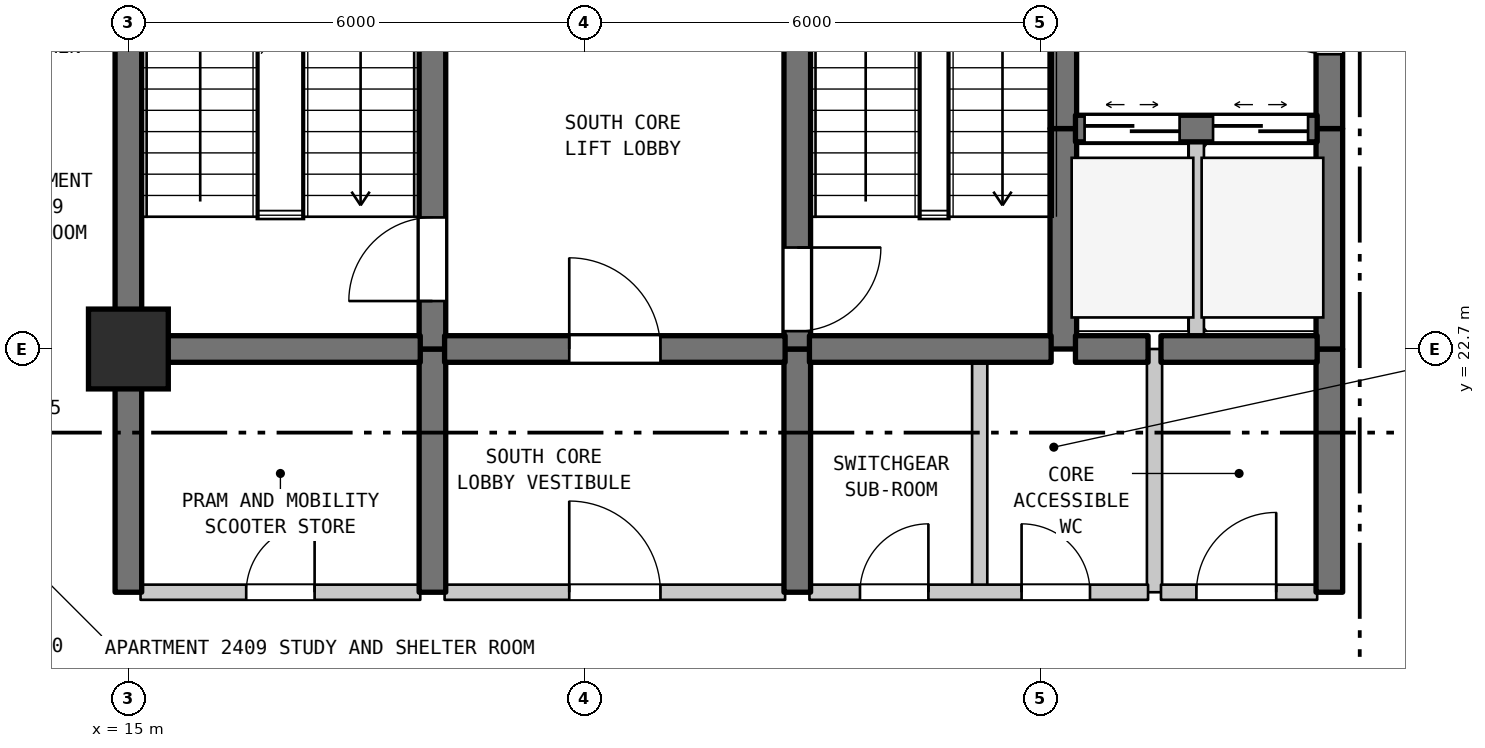
"""IFC4 building model, lengths in metres.
Left out: names, types, materials, properties, quantities, classifications, styles, units other than length and angle.
Written with IfcOpenShell. Run it as: python <this file> out.ifc"""

import sys

from ifc_helpers import new_model, si_unit, direction, frame, frame_2d, origin, origin_2d, place, context, subcontext, project, spatial, rectangle, extrude, element, fill, save


model = new_model("IFC4")
c1 = context("Model", 3, precision=1e-05, world=origin(), true_north=direction((0.0, 1.0)))
c2 = subcontext(c1, "Body", "Model", "MODEL_VIEW")
j1 = project(units=[si_unit("LENGTHUNIT", "METRE"), si_unit("PLANEANGLEUNIT", "RADIAN")], contexts=[c1])
p1 = place(None, origin())
s1 = spatial("IfcSite", under=j1, at=p1, CompositionType="ELEMENT")
p2 = place(p1, origin())
s2 = spatial("IfcBuilding", under=s1, at=p2, CompositionType="ELEMENT")
p3 = place(p2, frame((0.0, 0.0, 102.0)))
s3 = spatial("IfcBuildingStorey", under=s2, at=p3, CompositionType="ELEMENT", Elevation=102.0)
p4 = place(p3, frame((15.0, 22.7, 0.0), z_axis=(0.0, 0.0, 1.0), x_axis=(1.0, 0.0, 0.0)))
e1 = element("IfcColumn", 1, at=p4, inside=s3, PredefinedType="COLUMN", context=c2, shape_type="SweptSolid", body=[
    extrude(rectangle(XDim=1.05, YDim=1.05, at=origin_2d()), origin(), (0.0, 0.0, 1.0), 3.7),
])
p5 = place(p3, frame((15.0, 19.5, 0.0), z_axis=(0.0, 0.0, 1.0), x_axis=(0.0, 1.0, 0.0)))
e2 = element("IfcWall", 2, at=p5, inside=s3, PredefinedType="SHEAR", context=c2, shape_type="SweptSolid", body=[
    extrude(rectangle(XDim=3.2, YDim=0.35, at=frame_2d((1.6, 0.0))), origin(), (0.0, 0.0, 1.0), 3.385),
])
p6 = place(p3, frame((15.0, 22.7, 0.0), z_axis=(0.0, 0.0, 1.0), x_axis=(0.0, 1.0, 0.0)))
e3 = element("IfcWall", 3, at=p6, inside=s3, PredefinedType="SHEAR", context=c2, shape_type="SweptSolid", body=[
    extrude(rectangle(XDim=6.8, YDim=0.35, at=frame_2d((3.4, 0.0))), origin(), (0.0, 0.0, 1.0), 3.385),
])
p7 = place(p3, frame((19.0, 19.5, 0.0), z_axis=(0.0, 0.0, 1.0), x_axis=(0.0, 1.0, 0.0)))
e4 = element("IfcWall", 4, at=p7, inside=s3, PredefinedType="SHEAR", context=c2, shape_type="SweptSolid", body=[
    extrude(rectangle(XDim=3.2, YDim=0.35, at=frame_2d((1.6, 0.0))), origin(), (0.0, 0.0, 1.0), 3.385),
])
p8 = place(p3, frame((19.0, 22.7, 0.0), z_axis=(0.0, 0.0, 1.0), x_axis=(0.0, 1.0, 0.0)))
e5 = element("IfcWall", 5, at=p8, inside=s3, PredefinedType="SHEAR", context=c2, shape_type="SweptSolid", body=[
    extrude(rectangle(XDim=5.5, YDim=0.35, at=frame_2d((2.75, 0.0))), origin(), (0.0, 0.0, 1.0), 3.385),
])
p9 = place(p8, frame((0.631, 0.0, 0.0)))
e6 = element("IfcOpeningElement", 6, at=p9, cuts=e5, PredefinedType="OPENING", context=c2, shape_type="SweptSolid", body=[
    extrude(rectangle(XDim=1.1, YDim=2.15, at=frame_2d((0.55, 1.075))), frame((0.0, 0.185, 0.0), z_axis=(0.0, -1.0, 0.0), x_axis=(1.0, 0.0, 0.0)), (0.0, 0.0, 1.0), 0.37),
])
p10 = place(p3, frame((23.8, 19.5, 0.0), z_axis=(0.0, 0.0, 1.0), x_axis=(0.0, 1.0, 0.0)))
e7 = element("IfcWall", 7, at=p10, inside=s3, PredefinedType="SHEAR", context=c2, shape_type="SweptSolid", body=[
    extrude(rectangle(XDim=3.2, YDim=0.35, at=frame_2d((1.6, 0.0))), origin(), (0.0, 0.0, 1.0), 3.385),
])
p11 = place(p3, frame((23.8, 22.7, 0.0), z_axis=(0.0, 0.0, 1.0), x_axis=(0.0, 1.0, 0.0)))
e8 = element("IfcWall", 8, at=p11, inside=s3, PredefinedType="SHEAR", context=c2, shape_type="SweptSolid", body=[
    extrude(rectangle(XDim=5.5, YDim=0.35, at=frame_2d((2.75, 0.0))), origin(), (0.0, 0.0, 1.0), 3.385),
])
p12 = place(p11, frame((0.235, 0.0, 0.0)))
e9 = element("IfcOpeningElement", 9, at=p12, cuts=e8, PredefinedType="OPENING", context=c2, shape_type="SweptSolid", body=[
    extrude(rectangle(XDim=1.1, YDim=2.15, at=frame_2d((0.55, 1.075))), frame((0.0, 0.185, 0.0), z_axis=(0.0, -1.0, 0.0), x_axis=(1.0, 0.0, 0.0)), (0.0, 0.0, 1.0), 0.37),
])
p13 = place(p3, frame((26.2, 19.5, 0.0), z_axis=(0.0, 0.0, 1.0), x_axis=(0.0, 1.0, 0.0)))
e10 = element("IfcWall", 10, at=p13, inside=s3, PredefinedType="STANDARD", context=c2, shape_type="SweptSolid", body=[
    extrude(rectangle(XDim=3.2, YDim=0.2, at=frame_2d((1.6, 0.0))), origin(), (0.0, 0.0, 1.0), 3.385),
])
p14 = place(p3, frame((27.3, 22.7, 0.0), z_axis=(0.0, 0.0, 1.0), x_axis=(0.0, 1.0, 0.0)))
e11 = element("IfcWall", 11, at=p14, inside=s3, PredefinedType="SHEAR", context=c2, shape_type="SweptSolid", body=[
    extrude(rectangle(XDim=2.9, YDim=0.35, at=frame_2d((1.45, 0.0))), origin(), (0.0, 0.0, 1.0), 3.385),
])
p15 = place(p3, frame((27.3, 25.6, 0.0), z_axis=(0.0, 0.0, 1.0), x_axis=(0.0, 1.0, 0.0)))
e12 = element("IfcWall", 12, at=p15, inside=s3, PredefinedType="SHEAR", context=c2, shape_type="SweptSolid", body=[
    extrude(rectangle(XDim=3.3, YDim=0.35, at=frame_2d((1.65, 0.0))), origin(), (0.0, 0.0, 1.0), 3.385),
])
p16 = place(p3, frame((28.5, 19.5, 0.0), z_axis=(0.0, 0.0, 1.0), x_axis=(0.0, 1.0, 0.0)))
e13 = element("IfcWall", 13, at=p16, inside=s3, PredefinedType="STANDARD", context=c2, shape_type="SweptSolid", body=[
    extrude(rectangle(XDim=3.2, YDim=0.2, at=frame_2d((1.6, 0.0))), origin(), (0.0, 0.0, 1.0), 3.385),
])
p17 = place(p3, frame((29.05, 22.7, 0.0), z_axis=(0.0, 0.0, 1.0), x_axis=(0.0, 1.0, 0.0)))
e14 = element("IfcWall", 14, at=p17, inside=s3, PredefinedType="STANDARD", context=c2, shape_type="SweptSolid", body=[
    extrude(rectangle(XDim=2.9, YDim=0.2, at=frame_2d((1.45, 0.0))), origin(), (0.0, 0.0, 1.0), 3.385),
])
p18 = place(p3, frame((30.8, 19.5, 0.0), z_axis=(0.0, 0.0, 1.0), x_axis=(0.0, 1.0, 0.0)))
e15 = element("IfcWall", 15, at=p18, inside=s3, PredefinedType="SHEAR", context=c2, shape_type="SweptSolid", body=[
    extrude(rectangle(XDim=3.2, YDim=0.35, at=frame_2d((1.6, 0.0))), origin(), (0.0, 0.0, 1.0), 3.385),
])
p19 = place(p3, frame((30.8, 22.7, 0.0), z_axis=(0.0, 0.0, 1.0), x_axis=(0.0, 1.0, 0.0)))
e16 = element("IfcWall", 16, at=p19, inside=s3, PredefinedType="SHEAR", context=c2, shape_type="SweptSolid", body=[
    extrude(rectangle(XDim=2.9, YDim=0.35, at=frame_2d((1.45, 0.0))), origin(), (0.0, 0.0, 1.0), 3.385),
])
p20 = place(p3, frame((30.8, 25.6, 0.0), z_axis=(0.0, 0.0, 1.0), x_axis=(0.0, 1.0, 0.0)))
e17 = element("IfcWall", 17, at=p20, inside=s3, PredefinedType="SHEAR", context=c2, shape_type="SweptSolid", body=[
    extrude(rectangle(XDim=3.3, YDim=0.35, at=frame_2d((1.65, 0.0))), origin(), (0.0, 0.0, 1.0), 3.385),
])
p21 = place(p20, frame((0.978, 0.0, 0.0)))
e18 = element("IfcOpeningElement", 18, at=p21, cuts=e17, PredefinedType="OPENING", context=c2, shape_type="SweptSolid", body=[
    extrude(rectangle(XDim=1.2, YDim=2.2, at=frame_2d((0.6, 1.1))), frame((0.0, 0.185, 0.0), z_axis=(0.0, -1.0, 0.0), x_axis=(1.0, 0.0, 0.0)), (0.0, 0.0, 1.0), 0.37),
])
p22 = place(p3, frame((15.16, 19.5, 0.0), z_axis=(0.0, 0.0, 1.0), x_axis=(1.0, 0.0, 0.0)))
e19 = element("IfcWall", 19, at=p22, inside=s3, PredefinedType="STANDARD", context=c2, shape_type="SweptSolid", body=[
    extrude(rectangle(XDim=3.68, YDim=0.2, at=frame_2d((1.84, 0.0))), origin(), (0.0, 0.0, 1.0), 3.385),
])
p23 = place(p22, frame((1.39, 0.0, 0.0)))
e20 = element("IfcOpeningElement", 20, at=p23, cuts=e19, PredefinedType="OPENING", context=c2, shape_type="SweptSolid", body=[
    extrude(rectangle(XDim=0.9, YDim=2.15, at=frame_2d((0.45, 1.075))), frame((0.0, 0.11, 0.0), z_axis=(0.0, -1.0, 0.0), x_axis=(1.0, 0.0, 0.0)), (0.0, 0.0, 1.0), 0.22),
])
p24 = place(p3, frame((19.16, 19.5, 0.0), z_axis=(0.0, 0.0, 1.0), x_axis=(1.0, 0.0, 0.0)))
e21 = element("IfcWall", 21, at=p24, inside=s3, PredefinedType="STANDARD", context=c2, shape_type="SweptSolid", body=[
    extrude(rectangle(XDim=4.48, YDim=0.2, at=frame_2d((2.24, 0.0))), origin(), (0.0, 0.0, 1.0), 3.385),
])
p25 = place(p24, frame((1.64, 0.0, 0.0)))
e22 = element("IfcOpeningElement", 22, at=p25, cuts=e21, PredefinedType="OPENING", context=c2, shape_type="SweptSolid", body=[
    extrude(rectangle(XDim=1.2, YDim=2.2, at=frame_2d((0.6, 1.1))), frame((0.0, 0.11, 0.0), z_axis=(0.0, -1.0, 0.0), x_axis=(1.0, 0.0, 0.0)), (0.0, 0.0, 1.0), 0.22),
])
p26 = place(p3, frame((23.96, 19.5, 0.0), z_axis=(0.0, 0.0, 1.0), x_axis=(1.0, 0.0, 0.0)))
e23 = element("IfcWall", 23, at=p26, inside=s3, PredefinedType="STANDARD", context=c2, shape_type="SweptSolid", body=[
    extrude(rectangle(XDim=4.455, YDim=0.2, at=frame_2d((2.228, 0.0))), origin(), (0.0, 0.0, 1.0), 3.385),
])
p27 = place(p26, frame((0.665, 0.0, 0.0)))
e24 = element("IfcOpeningElement", 24, at=p27, cuts=e23, PredefinedType="OPENING", context=c2, shape_type="SweptSolid", body=[
    extrude(rectangle(XDim=0.9, YDim=2.15, at=frame_2d((0.45, 1.075))), frame((0.0, 0.11, 0.0), z_axis=(0.0, -1.0, 0.0), x_axis=(1.0, 0.0, 0.0)), (0.0, 0.0, 1.0), 0.22),
])
p28 = place(p26, frame((2.791, 0.0, 0.0)))
e25 = element("IfcOpeningElement", 25, at=p28, cuts=e23, PredefinedType="OPENING", context=c2, shape_type="SweptSolid", body=[
    extrude(rectangle(XDim=0.9, YDim=2.15, at=frame_2d((0.45, 1.075))), frame((0.0, 0.11, 0.0), z_axis=(0.0, -1.0, 0.0), x_axis=(1.0, 0.0, 0.0)), (0.0, 0.0, 1.0), 0.22),
])
p29 = place(p3, frame((28.585, 19.5, 0.0), z_axis=(0.0, 0.0, 1.0), x_axis=(1.0, 0.0, 0.0)))
e26 = element("IfcWall", 26, at=p29, inside=s3, PredefinedType="STANDARD", context=c2, shape_type="SweptSolid", body=[
    extrude(rectangle(XDim=2.055, YDim=0.2, at=frame_2d((1.027, 0.0))), origin(), (0.0, 0.0, 1.0), 3.385),
])
p30 = place(p29, frame((0.466, 0.0, 0.0)))
e27 = element("IfcOpeningElement", 27, at=p30, cuts=e26, PredefinedType="OPENING", context=c2, shape_type="SweptSolid", body=[
    extrude(rectangle(XDim=1.05, YDim=2.15, at=frame_2d((0.525, 1.075))), frame((0.0, 0.11, 0.0), z_axis=(0.0, -1.0, 0.0), x_axis=(1.0, 0.0, 0.0)), (0.0, 0.0, 1.0), 0.22),
])
p31 = place(p3, frame((15.16, 22.7, 0.0), z_axis=(0.0, 0.0, 1.0), x_axis=(1.0, 0.0, 0.0)))
e28 = element("IfcWall", 28, at=p31, inside=s3, PredefinedType="SHEAR", context=c2, shape_type="SweptSolid", body=[
    extrude(rectangle(XDim=3.68, YDim=0.35, at=frame_2d((1.84, 0.0))), origin(), (0.0, 0.0, 1.0), 3.385),
])
p32 = place(p3, frame((19.16, 22.7, 0.0), z_axis=(0.0, 0.0, 1.0), x_axis=(1.0, 0.0, 0.0)))
e29 = element("IfcWall", 29, at=p32, inside=s3, PredefinedType="SHEAR", context=c2, shape_type="SweptSolid", body=[
    extrude(rectangle(XDim=4.48, YDim=0.35, at=frame_2d((2.24, 0.0))), origin(), (0.0, 0.0, 1.0), 3.385),
])
p33 = place(p32, frame((1.64, 0.0, 0.0)))
e30 = element("IfcOpeningElement", 30, at=p33, cuts=e29, PredefinedType="OPENING", context=c2, shape_type="SweptSolid", body=[
    extrude(rectangle(XDim=1.2, YDim=2.2, at=frame_2d((0.6, 1.1))), frame((0.0, 0.185, 0.0), z_axis=(0.0, -1.0, 0.0), x_axis=(1.0, 0.0, 0.0)), (0.0, 0.0, 1.0), 0.37),
])
p34 = place(p3, frame((23.96, 22.7, 0.0), z_axis=(0.0, 0.0, 1.0), x_axis=(1.0, 0.0, 0.0)))
e31 = element("IfcWall", 31, at=p34, inside=s3, PredefinedType="SHEAR", context=c2, shape_type="SweptSolid", body=[
    extrude(rectangle(XDim=3.18, YDim=0.35, at=frame_2d((1.59, 0.0))), origin(), (0.0, 0.0, 1.0), 3.385),
])
p35 = place(p3, frame((27.46, 22.7, 0.0), z_axis=(0.0, 0.0, 1.0), x_axis=(1.0, 0.0, 0.0)))
e32 = element("IfcWall", 32, at=p35, inside=s3, PredefinedType="SHEAR", context=c2, shape_type="SweptSolid", body=[
    extrude(rectangle(XDim=0.955, YDim=0.35, at=frame_2d((0.478, 0.0))), origin(), (0.0, 0.0, 1.0), 3.385),
])
p36 = place(p3, frame((28.585, 22.7, 0.0), z_axis=(0.0, 0.0, 1.0), x_axis=(1.0, 0.0, 0.0)))
e33 = element("IfcWall", 33, at=p36, inside=s3, PredefinedType="SHEAR", context=c2, shape_type="SweptSolid", body=[
    extrude(rectangle(XDim=2.055, YDim=0.35, at=frame_2d((1.027, 0.0))), origin(), (0.0, 0.0, 1.0), 3.385),
])
p37 = place(p3, frame((27.46, 25.6, 0.0), z_axis=(0.0, 0.0, 1.0), x_axis=(1.0, 0.0, 0.0)))
e34 = element("IfcWall", 34, at=p37, inside=s3, PredefinedType="SHEAR", context=c2, shape_type="SweptSolid", body=[
    extrude(rectangle(XDim=3.18, YDim=0.35, at=frame_2d((1.59, 0.0))), origin(), (0.0, 0.0, 1.0), 3.385),
])
p38 = place(p37, frame((0.12, 0.0, 0.0)))
e35 = element("IfcOpeningElement", 35, at=p38, cuts=e34, PredefinedType="OPENING", context=c2, shape_type="SweptSolid", body=[
    extrude(rectangle(XDim=1.25, YDim=2.2, at=frame_2d((0.625, 1.1))), frame((0.0, 0.185, 0.0), z_axis=(0.0, -1.0, 0.0), x_axis=(1.0, 0.0, 0.0)), (0.0, 0.0, 1.0), 0.37),
])
p39 = place(p37, frame((1.81, 0.0, 0.0)))
e36 = element("IfcOpeningElement", 36, at=p39, cuts=e34, PredefinedType="OPENING", context=c2, shape_type="SweptSolid", body=[
    extrude(rectangle(XDim=1.25, YDim=2.2, at=frame_2d((0.625, 1.1))), frame((0.0, 0.185, 0.0), z_axis=(0.0, -1.0, 0.0), x_axis=(1.0, 0.0, 0.0)), (0.0, 0.0, 1.0), 0.37),
])
p40 = place(p9, origin())
e37 = element("IfcDoor", 37, at=p40, inside=s3, OperationType="SINGLE_SWING_LEFT", PredefinedType="DOOR", context=c2, shape_type="SweptSolid", body=[
    extrude(rectangle(XDim=1.1, YDim=2.15, at=frame_2d((0.55, 1.075))), frame((0.0, 0.025, 0.0), z_axis=(0.0, -1.0, 0.0), x_axis=(1.0, 0.0, 0.0)), (0.0, 0.0, 1.0), 0.05),
])
fill(e6, e37)
p41 = place(p12, frame((1.1, 0.0, 0.0), z_axis=(0.0, 0.0, 1.0), x_axis=(-1.0, 0.0, 0.0)))
e38 = element("IfcDoor", 38, at=p41, inside=s3, OperationType="SINGLE_SWING_RIGHT", PredefinedType="DOOR", context=c2, shape_type="SweptSolid", body=[
    extrude(rectangle(XDim=1.1, YDim=2.15, at=frame_2d((0.55, 1.075))), frame((0.0, 0.025, 0.0), z_axis=(0.0, -1.0, 0.0), x_axis=(1.0, 0.0, 0.0)), (0.0, 0.0, 1.0), 0.05),
])
fill(e9, e38)
p42 = place(p21, origin())
e39 = element("IfcDoor", 39, at=p42, inside=s3, OperationType="SINGLE_SWING_RIGHT", PredefinedType="DOOR", context=c2, shape_type="SweptSolid", body=[
    extrude(rectangle(XDim=1.2, YDim=2.2, at=frame_2d((0.6, 1.1))), frame((0.0, 0.025, 0.0), z_axis=(0.0, -1.0, 0.0), x_axis=(1.0, 0.0, 0.0)), (0.0, 0.0, 1.0), 0.05),
])
fill(e18, e39)
p43 = place(p23, origin())
e40 = element("IfcDoor", 40, at=p43, inside=s3, OperationType="SINGLE_SWING_RIGHT", PredefinedType="DOOR", context=c2, shape_type="SweptSolid", body=[
    extrude(rectangle(XDim=0.9, YDim=2.15, at=frame_2d((0.45, 1.075))), frame((0.0, 0.025, 0.0), z_axis=(0.0, -1.0, 0.0), x_axis=(1.0, 0.0, 0.0)), (0.0, 0.0, 1.0), 0.05),
])
fill(e20, e40)
p44 = place(p25, origin())
e41 = element("IfcDoor", 41, at=p44, inside=s3, OperationType="SINGLE_SWING_LEFT", PredefinedType="DOOR", context=c2, shape_type="SweptSolid", body=[
    extrude(rectangle(XDim=1.2, YDim=2.2, at=frame_2d((0.6, 1.1))), frame((0.0, 0.025, 0.0), z_axis=(0.0, -1.0, 0.0), x_axis=(1.0, 0.0, 0.0)), (0.0, 0.0, 1.0), 0.05),
])
fill(e22, e41)
p45 = place(p27, origin())
e42 = element("IfcDoor", 42, at=p45, inside=s3, OperationType="SINGLE_SWING_RIGHT", PredefinedType="DOOR", context=c2, shape_type="SweptSolid", body=[
    extrude(rectangle(XDim=0.9, YDim=2.15, at=frame_2d((0.45, 1.075))), frame((0.0, 0.025, 0.0), z_axis=(0.0, -1.0, 0.0), x_axis=(1.0, 0.0, 0.0)), (0.0, 0.0, 1.0), 0.05),
])
fill(e24, e42)
p46 = place(p28, origin())
e43 = element("IfcDoor", 43, at=p46, inside=s3, OperationType="SINGLE_SWING_LEFT", PredefinedType="DOOR", context=c2, shape_type="SweptSolid", body=[
    extrude(rectangle(XDim=0.9, YDim=2.15, at=frame_2d((0.45, 1.075))), frame((0.0, 0.025, 0.0), z_axis=(0.0, -1.0, 0.0), x_axis=(1.0, 0.0, 0.0)), (0.0, 0.0, 1.0), 0.05),
])
fill(e25, e43)
p47 = place(p30, origin())
e44 = element("IfcDoor", 44, at=p47, inside=s3, OperationType="SINGLE_SWING_RIGHT", PredefinedType="DOOR", context=c2, shape_type="SweptSolid", body=[
    extrude(rectangle(XDim=1.05, YDim=2.15, at=frame_2d((0.525, 1.075))), frame((0.0, 0.025, 0.0), z_axis=(0.0, -1.0, 0.0), x_axis=(1.0, 0.0, 0.0)), (0.0, 0.0, 1.0), 0.05),
])
fill(e27, e44)
p48 = place(p33, origin())
e45 = element("IfcDoor", 45, at=p48, inside=s3, OperationType="SINGLE_SWING_LEFT", PredefinedType="DOOR", context=c2, shape_type="SweptSolid", body=[
    extrude(rectangle(XDim=1.2, YDim=2.2, at=frame_2d((0.6, 1.1))), frame((0.0, 0.025, 0.0), z_axis=(0.0, -1.0, 0.0), x_axis=(1.0, 0.0, 0.0)), (0.0, 0.0, 1.0), 0.05),
])
fill(e30, e45)
p49 = place(p38, origin())
e46 = element("IfcDoor", 46, at=p49, inside=s3, OperationType="DOUBLE_DOOR_SLIDING", PredefinedType="DOOR", context=c2, shape_type="SweptSolid", body=[
    extrude(rectangle(XDim=1.25, YDim=2.2, at=frame_2d((0.625, 1.1))), frame((0.0, 0.025, 0.0), z_axis=(0.0, -1.0, 0.0), x_axis=(1.0, 0.0, 0.0)), (0.0, 0.0, 1.0), 0.05),
])
fill(e35, e46)
p50 = place(p39, origin())
e47 = element("IfcDoor", 47, at=p50, inside=s3, OperationType="DOUBLE_DOOR_SLIDING", PredefinedType="DOOR", context=c2, shape_type="SweptSolid", body=[
    extrude(rectangle(XDim=1.25, YDim=2.2, at=frame_2d((0.625, 1.1))), frame((0.0, 0.025, 0.0), z_axis=(0.0, -1.0, 0.0), x_axis=(1.0, 0.0, 0.0)), (0.0, 0.0, 1.0), 0.05),
])
fill(e36, e47)
save(model, sys.argv[1])
